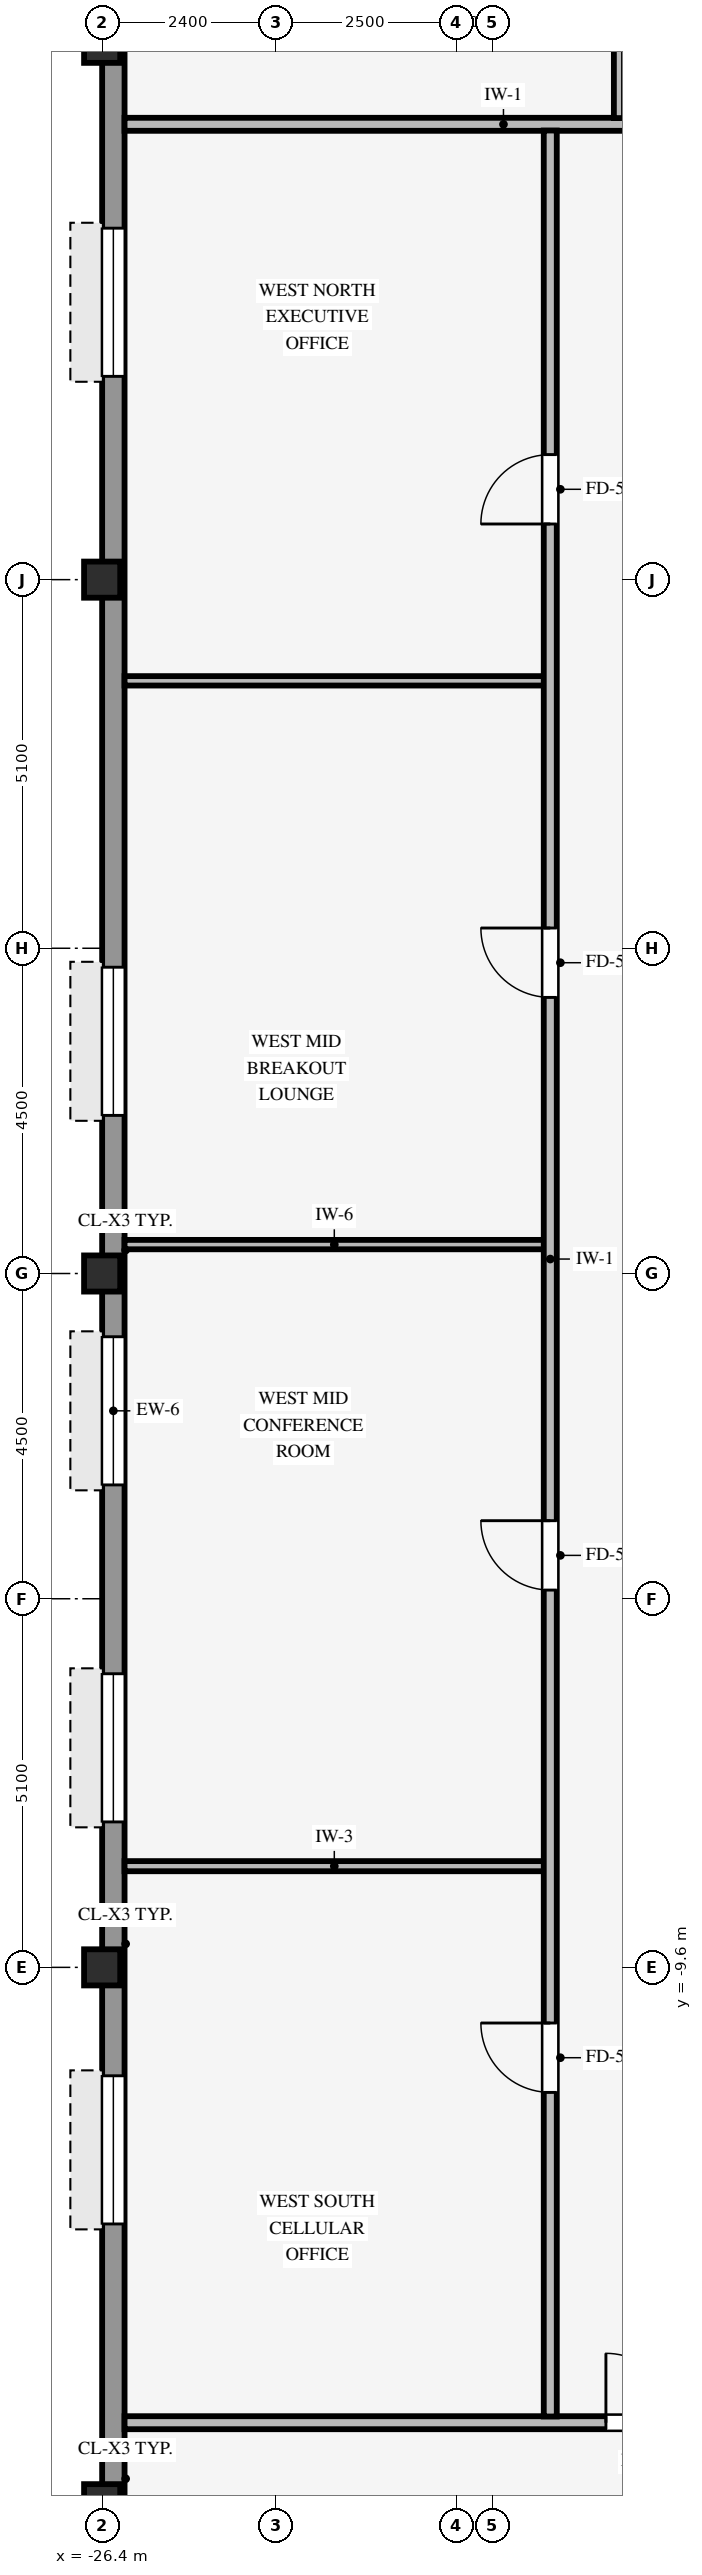
"""IFC4 building model, lengths in metres.
Left out: names, types, materials, properties, quantities, classifications, styles, units other than length and angle.
Written with IfcOpenShell. Run it as: python <this file> out.ifc"""

import sys

from ifc_helpers import new_model, si_unit, direction, frame, frame_2d, origin, origin_2d, place, context, subcontext, project, spatial, rectangle, hollow_rectangle, extrude, source, transform, mapped, element, fill, save


model = new_model("IFC4")
c1 = context("Model", 3, precision=1e-05, world=origin(), true_north=direction((0.0, 1.0)))
c2 = subcontext(c1, "Body", "Model", "MODEL_VIEW")
j1 = project(units=[si_unit("LENGTHUNIT", "METRE"), si_unit("PLANEANGLEUNIT", "RADIAN")], contexts=[c1])
p1 = place(None, origin())
s1 = spatial("IfcSite", under=j1, at=p1, CompositionType="ELEMENT")
p2 = place(p1, origin())
s2 = spatial("IfcBuilding", under=s1, at=p2, CompositionType="ELEMENT")
p3 = place(p2, frame((0.0, 0.0, 205.5)))
s3 = spatial("IfcBuildingStorey", under=s2, at=p3, CompositionType="ELEMENT", Elevation=205.5)
for number, where, z_axis, x_axis in (
    (1, (-26.4, -17.0, 0.0), (0.0, 0.0, 1.0), (1.0, 0.0, 0.0)),
    (2, (-26.4, -9.6, 0.0), (0.0, 0.0, 1.0), (1.0, 0.0, 0.0)),
    (3, (-26.4, 0.0, 0.0), (0.0, 0.0, 1.0), (1.0, 0.0, 0.0)),
    (4, (-26.4, 9.6, 0.0), (0.0, 0.0, 1.0), (1.0, 0.0, 0.0)),
    (5, (-26.4, 17.0, 0.0), (0.0, 0.0, 1.0), (1.0, 0.0, 0.0)),
):
    element("IfcColumn", number, at=place(p3, frame(where, z_axis=z_axis, x_axis=x_axis)), inside=s3, PredefinedType="COLUMN", context=c2, shape_type="SweptSolid", body=[
        extrude(hollow_rectangle(XDim=0.5, YDim=0.5, WallThickness=0.032, InnerFilletRadius=0.032, OuterFilletRadius=0.064, at=origin_2d()), origin(), (0.0, 0.0, 1.0), 3.25),
    ])
p4 = place(p3, frame((-26.245, -20.794, 0.0), z_axis=(0.0, 0.0, 1.0), x_axis=(0.0, 1.0, 0.0)))
e6 = element("IfcWall", 6, at=p4, inside=s3, PredefinedType="STANDARD", context=c2, shape_type="SweptSolid", body=[
    extrude(rectangle(XDim=37.788, YDim=0.31, at=frame_2d((18.894, 0.0))), origin(), (0.0, 0.0, 1.0), 2.585),
])
p5 = place(p4, frame((7.644, 0.0, 0.8)))
e7 = element("IfcOpeningElement", 7, at=p5, cuts=e6, PredefinedType="OPENING", context=c2, shape_type="SweptSolid", body=[
    extrude(rectangle(XDim=2.05, YDim=1.52, at=frame_2d((1.025, 0.76))), frame((0.0, 0.165, 0.0), z_axis=(0.0, -1.0, 0.0), x_axis=(1.0, 0.0, 0.0)), (0.0, 0.0, 1.0), 0.33),
])
p6 = place(p4, frame((13.206, 0.0, 0.8)))
e8 = element("IfcOpeningElement", 8, at=p6, cuts=e6, PredefinedType="OPENING", context=c2, shape_type="SweptSolid", body=[
    extrude(rectangle(XDim=2.05, YDim=1.52, at=frame_2d((1.025, 0.76))), frame((0.0, 0.165, 0.0), z_axis=(0.0, -1.0, 0.0), x_axis=(1.0, 0.0, 0.0)), (0.0, 0.0, 1.0), 0.33),
])
p7 = place(p4, frame((17.869, 0.0, 0.8)))
e9 = element("IfcOpeningElement", 9, at=p7, cuts=e6, PredefinedType="OPENING", context=c2, shape_type="SweptSolid", body=[
    extrude(rectangle(XDim=2.05, YDim=1.52, at=frame_2d((1.025, 0.76))), frame((0.0, 0.165, 0.0), z_axis=(0.0, -1.0, 0.0), x_axis=(1.0, 0.0, 0.0)), (0.0, 0.0, 1.0), 0.33),
])
p8 = place(p4, frame((22.982, 0.0, 0.8)))
e10 = element("IfcOpeningElement", 10, at=p8, cuts=e6, PredefinedType="OPENING", context=c2, shape_type="SweptSolid", body=[
    extrude(rectangle(XDim=2.05, YDim=1.52, at=frame_2d((1.025, 0.76))), frame((0.0, 0.165, 0.0), z_axis=(0.0, -1.0, 0.0), x_axis=(1.0, 0.0, 0.0)), (0.0, 0.0, 1.0), 0.33),
])
p9 = place(p4, frame((33.207, 0.0, 0.8)))
e11 = element("IfcOpeningElement", 11, at=p9, cuts=e6, PredefinedType="OPENING", context=c2, shape_type="SweptSolid", body=[
    extrude(rectangle(XDim=2.05, YDim=1.52, at=frame_2d((1.025, 0.76))), frame((0.0, 0.165, 0.0), z_axis=(0.0, -1.0, 0.0), x_axis=(1.0, 0.0, 0.0)), (0.0, 0.0, 1.0), 0.33),
])
p10 = place(p3, frame((-26.09, -15.9, 0.0), z_axis=(0.0, 0.0, 1.0), x_axis=(1.0, 0.0, 0.0)))
e12 = element("IfcWall", 12, at=p10, inside=s3, PredefinedType="PARTITIONING", context=c2, shape_type="SweptSolid", body=[
    extrude(rectangle(XDim=48.38, YDim=0.18, at=frame_2d((24.19, 0.0))), origin(), (0.0, 0.0, 1.0), 3.24),
])
p11 = place(p10, frame((15.56, 0.0, 0.0)))
e13 = element("IfcOpeningElement", 13, at=p11, cuts=e12, PredefinedType="OPENING", context=c2, shape_type="SweptSolid", body=[
    extrude(rectangle(XDim=0.96, YDim=2.1, at=frame_2d((0.48, 1.05))), frame((0.0, 0.1, 0.0), z_axis=(0.0, -1.0, 0.0), x_axis=(1.0, 0.0, 0.0)), (0.0, 0.0, 1.0), 0.2),
])
p12 = place(p10, frame((40.51, 0.0, 0.0)))
e14 = element("IfcOpeningElement", 14, at=p12, cuts=e12, PredefinedType="OPENING", context=c2, shape_type="SweptSolid", body=[
    extrude(rectangle(XDim=0.96, YDim=2.1, at=frame_2d((0.48, 1.05))), frame((0.0, 0.1, 0.0), z_axis=(0.0, -1.0, 0.0), x_axis=(1.0, 0.0, 0.0)), (0.0, 0.0, 1.0), 0.2),
])
p13 = place(p10, frame((6.66, 0.0, 0.0)))
e15 = element("IfcOpeningElement", 15, at=p13, cuts=e12, PredefinedType="OPENING", context=c2, shape_type="SweptSolid", body=[
    extrude(rectangle(XDim=0.96, YDim=2.1, at=frame_2d((0.48, 1.05))), frame((0.0, 0.1, 0.0), z_axis=(0.0, -1.0, 0.0), x_axis=(1.0, 0.0, 0.0)), (0.0, 0.0, 1.0), 0.2),
])
p14 = place(p3, frame((-26.09, -8.2, 0.0), z_axis=(0.0, 0.0, 1.0), x_axis=(1.0, 0.0, 0.0)))
e16 = element("IfcWall", 16, at=p14, inside=s3, PredefinedType="PARTITIONING", context=c2, shape_type="SweptSolid", body=[
    extrude(rectangle(XDim=5.804, YDim=0.14, at=frame_2d((2.902, 0.0))), origin(), (0.0, 0.0, 1.0), 3.24),
])
p15 = place(p3, frame((-26.09, 0.4, 0.0), z_axis=(0.0, 0.0, 1.0), x_axis=(1.0, 0.0, 0.0)))
e17 = element("IfcWall", 17, at=p15, inside=s3, PredefinedType="PARTITIONING", context=c2, shape_type="SweptSolid", body=[
    extrude(rectangle(XDim=5.804, YDim=0.13, at=frame_2d((2.902, 0.0))), origin(), (0.0, 0.0, 1.0), 2.696),
])
p16 = place(p3, frame((-26.09, 8.2, 0.0), z_axis=(0.0, 0.0, 1.0), x_axis=(1.0, 0.0, 0.0)))
e18 = element("IfcWall", 18, at=p16, inside=s3, PredefinedType="PARTITIONING", context=c2, shape_type="SweptSolid", body=[
    extrude(rectangle(XDim=5.804, YDim=0.13, at=frame_2d((2.902, 0.0))), origin(), (0.0, 0.0, 1.0), 3.24),
])
p17 = place(p3, frame((-26.09, 15.9, 0.0), z_axis=(0.0, 0.0, 1.0), x_axis=(1.0, 0.0, 0.0)))
e19 = element("IfcWall", 19, at=p17, inside=s3, PredefinedType="PARTITIONING", context=c2, shape_type="SweptSolid", body=[
    extrude(rectangle(XDim=48.38, YDim=0.18, at=frame_2d((24.19, 0.0))), origin(), (0.0, 0.0, 1.0), 3.24),
])
p18 = place(p17, frame((41.81, 0.0, 0.0)))
e20 = element("IfcOpeningElement", 20, at=p18, cuts=e19, PredefinedType="OPENING", context=c2, shape_type="SweptSolid", body=[
    extrude(rectangle(XDim=0.96, YDim=2.1, at=frame_2d((0.48, 1.05))), frame((0.0, 0.1, 0.0), z_axis=(0.0, -1.0, 0.0), x_axis=(1.0, 0.0, 0.0)), (0.0, 0.0, 1.0), 0.2),
])
p19 = place(p17, frame((17.985, 0.0, 0.0)))
e21 = element("IfcOpeningElement", 21, at=p19, cuts=e19, PredefinedType="OPENING", context=c2, shape_type="SweptSolid", body=[
    extrude(rectangle(XDim=0.96, YDim=2.1, at=frame_2d((0.48, 1.05))), frame((0.0, 0.1, 0.0), z_axis=(0.0, -1.0, 0.0), x_axis=(1.0, 0.0, 0.0)), (0.0, 0.0, 1.0), 0.2),
])
p20 = place(p17, frame((26.55, 0.0, 0.0)))
e22 = element("IfcOpeningElement", 22, at=p20, cuts=e19, PredefinedType="OPENING", context=c2, shape_type="SweptSolid", body=[
    extrude(rectangle(XDim=0.96, YDim=2.1, at=frame_2d((0.48, 1.05))), frame((0.0, 0.1, 0.0), z_axis=(0.0, -1.0, 0.0), x_axis=(1.0, 0.0, 0.0)), (0.0, 0.0, 1.0), 0.2),
])
p21 = place(p17, frame((10.935, 0.0, 0.0)))
e23 = element("IfcOpeningElement", 23, at=p21, cuts=e19, PredefinedType="OPENING", context=c2, shape_type="SweptSolid", body=[
    extrude(rectangle(XDim=0.96, YDim=2.1, at=frame_2d((0.48, 1.05))), frame((0.0, 0.1, 0.0), z_axis=(0.0, -1.0, 0.0), x_axis=(1.0, 0.0, 0.0)), (0.0, 0.0, 1.0), 0.2),
])
p22 = place(p17, frame((35.91, 0.0, 0.0)))
e24 = element("IfcOpeningElement", 24, at=p22, cuts=e19, PredefinedType="OPENING", context=c2, shape_type="SweptSolid", body=[
    extrude(rectangle(XDim=0.96, YDim=2.1, at=frame_2d((0.48, 1.05))), frame((0.0, 0.1, 0.0), z_axis=(0.0, -1.0, 0.0), x_axis=(1.0, 0.0, 0.0)), (0.0, 0.0, 1.0), 0.2),
])
p23 = place(p3, frame((-20.2, -15.814, 0.0), z_axis=(0.0, 0.0, 1.0), x_axis=(0.0, 1.0, 0.0)))
e25 = element("IfcWall", 25, at=p23, inside=s3, PredefinedType="PARTITIONING", context=c2, shape_type="SweptSolid", body=[
    extrude(rectangle(XDim=31.628, YDim=0.18, at=frame_2d((15.814, 0.0))), origin(), (0.0, 0.0, 1.0), 3.24),
])
p24 = place(p23, frame((11.434, 0.0, 0.0)))
e26 = element("IfcOpeningElement", 26, at=p24, cuts=e25, PredefinedType="OPENING", context=c2, shape_type="SweptSolid", body=[
    extrude(rectangle(XDim=0.96, YDim=2.1, at=frame_2d((0.48, 1.05))), frame((0.0, 0.1, 0.0), z_axis=(0.0, -1.0, 0.0), x_axis=(1.0, 0.0, 0.0)), (0.0, 0.0, 1.0), 0.2),
])
p25 = place(p23, frame((19.634, 0.0, 0.0)))
e27 = element("IfcOpeningElement", 27, at=p25, cuts=e25, PredefinedType="OPENING", context=c2, shape_type="SweptSolid", body=[
    extrude(rectangle(XDim=0.96, YDim=2.1, at=frame_2d((0.48, 1.05))), frame((0.0, 0.1, 0.0), z_axis=(0.0, -1.0, 0.0), x_axis=(1.0, 0.0, 0.0)), (0.0, 0.0, 1.0), 0.2),
])
p26 = place(p23, frame((4.484, 0.0, 0.0)))
e28 = element("IfcOpeningElement", 28, at=p26, cuts=e25, PredefinedType="OPENING", context=c2, shape_type="SweptSolid", body=[
    extrude(rectangle(XDim=0.96, YDim=2.1, at=frame_2d((0.48, 1.05))), frame((0.0, 0.1, 0.0), z_axis=(0.0, -1.0, 0.0), x_axis=(1.0, 0.0, 0.0)), (0.0, 0.0, 1.0), 0.2),
])
p27 = place(p23, frame((26.184, 0.0, 0.0)))
e29 = element("IfcOpeningElement", 29, at=p27, cuts=e25, PredefinedType="OPENING", context=c2, shape_type="SweptSolid", body=[
    extrude(rectangle(XDim=0.96, YDim=2.1, at=frame_2d((0.48, 1.05))), frame((0.0, 0.1, 0.0), z_axis=(0.0, -1.0, 0.0), x_axis=(1.0, 0.0, 0.0)), (0.0, 0.0, 1.0), 0.2),
])
p28 = place(p3, frame((-19.25, 15.986, 0.0), z_axis=(0.0, 0.0, 1.0), x_axis=(0.0, 1.0, 0.0)))
e30 = element("IfcWall", 30, at=p28, inside=s3, PredefinedType="PARTITIONING", context=c2, shape_type="SweptSolid", body=[
    extrude(rectangle(XDim=3.104, YDim=0.14, at=frame_2d((1.552, 0.0))), origin(), (0.0, 0.0, 1.0), 3.24),
])
p29 = place(p28, frame((1.082, 0.0, 0.0)))
e31 = element("IfcOpeningElement", 31, at=p29, cuts=e30, PredefinedType="OPENING", context=c2, shape_type="SweptSolid", body=[
    extrude(rectangle(XDim=0.94, YDim=2.1, at=frame_2d((0.47, 1.05))), frame((0.0, 0.08, 0.0), z_axis=(0.0, -1.0, 0.0), x_axis=(1.0, 0.0, 0.0)), (0.0, 0.0, 1.0), 0.16),
])
m1 = source(origin(), c2, "Body", "SweptSolid", [
    extrude(rectangle(XDim=2.05, YDim=1.52, at=frame_2d((1.025, 0.76))), frame((0.0, 0.03, 0.0), z_axis=(0.0, -1.0, 0.0), x_axis=(1.0, 0.0, 0.0)), (0.0, 0.0, 1.0), 0.06),
])
p30 = place(p5, origin())
e32 = element("IfcWindow", 32, at=p30, inside=s3, PartitioningType="SINGLE_PANEL", PredefinedType="WINDOW", context=c2, shape_type="MappedRepresentation", body=[
    mapped(m1, transform((0.0, 0.0, 0.0), scale=1.0)),
])
fill(e7, e32)
p31 = place(p6, origin())
e33 = element("IfcWindow", 33, at=p31, inside=s3, PartitioningType="SINGLE_PANEL", PredefinedType="WINDOW", context=c2, shape_type="MappedRepresentation", body=[
    mapped(m1, transform((0.0, 0.0, 0.0), scale=1.0)),
])
fill(e8, e33)
p32 = place(p7, origin())
e34 = element("IfcWindow", 34, at=p32, inside=s3, PartitioningType="SINGLE_PANEL", PredefinedType="WINDOW", context=c2, shape_type="MappedRepresentation", body=[
    mapped(m1, transform((0.0, 0.0, 0.0), scale=1.0)),
])
fill(e9, e34)
p33 = place(p8, origin())
e35 = element("IfcWindow", 35, at=p33, inside=s3, PartitioningType="SINGLE_PANEL", PredefinedType="WINDOW", context=c2, shape_type="MappedRepresentation", body=[
    mapped(m1, transform((0.0, 0.0, 0.0), scale=1.0)),
])
fill(e10, e35)
p34 = place(p9, origin())
e36 = element("IfcWindow", 36, at=p34, inside=s3, PartitioningType="SINGLE_PANEL", PredefinedType="WINDOW", context=c2, shape_type="MappedRepresentation", body=[
    mapped(m1, transform((0.0, 0.0, 0.0), scale=1.0)),
])
fill(e11, e36)
m2 = source(origin(), c2, "Body", "SweptSolid", [
    extrude(rectangle(XDim=0.96, YDim=2.1, at=frame_2d((0.48, 1.05))), frame((0.0, 0.025, 0.0), z_axis=(0.0, -1.0, 0.0), x_axis=(1.0, 0.0, 0.0)), (0.0, 0.0, 1.0), 0.05),
])
p35 = place(p24, origin())
e37 = element("IfcDoor", 37, at=p35, inside=s3, OperationType="SINGLE_SWING_RIGHT", PredefinedType="DOOR", context=c2, shape_type="MappedRepresentation", body=[
    mapped(m2, transform((0.0, 0.0, 0.0), scale=1.0)),
])
fill(e26, e37)
p36 = place(p25, origin())
e38 = element("IfcDoor", 38, at=p36, inside=s3, OperationType="SINGLE_SWING_RIGHT", PredefinedType="DOOR", context=c2, shape_type="MappedRepresentation", body=[
    mapped(m2, transform((0.0, 0.0, 0.0), scale=1.0)),
])
fill(e27, e38)
p37 = place(p26, origin())
e39 = element("IfcDoor", 39, at=p37, inside=s3, OperationType="SINGLE_SWING_RIGHT", PredefinedType="DOOR", context=c2, shape_type="MappedRepresentation", body=[
    mapped(m2, transform((0.0, 0.0, 0.0), scale=1.0)),
])
fill(e28, e39)
p38 = place(p27, origin())
e40 = element("IfcDoor", 40, at=p38, inside=s3, OperationType="SINGLE_SWING_LEFT", PredefinedType="DOOR", context=c2, shape_type="MappedRepresentation", body=[
    mapped(m2, transform((0.0, 0.0, 0.0), scale=1.0)),
])
fill(e29, e40)
p39 = place(p13, origin())
e41 = element("IfcDoor", 41, at=p39, inside=s3, OperationType="SINGLE_SWING_LEFT", PredefinedType="DOOR", context=c2, shape_type="MappedRepresentation", body=[
    mapped(m2, transform((0.0, 0.0, 0.0), scale=1.0)),
])
fill(e15, e41)
save(model, sys.argv[1])
